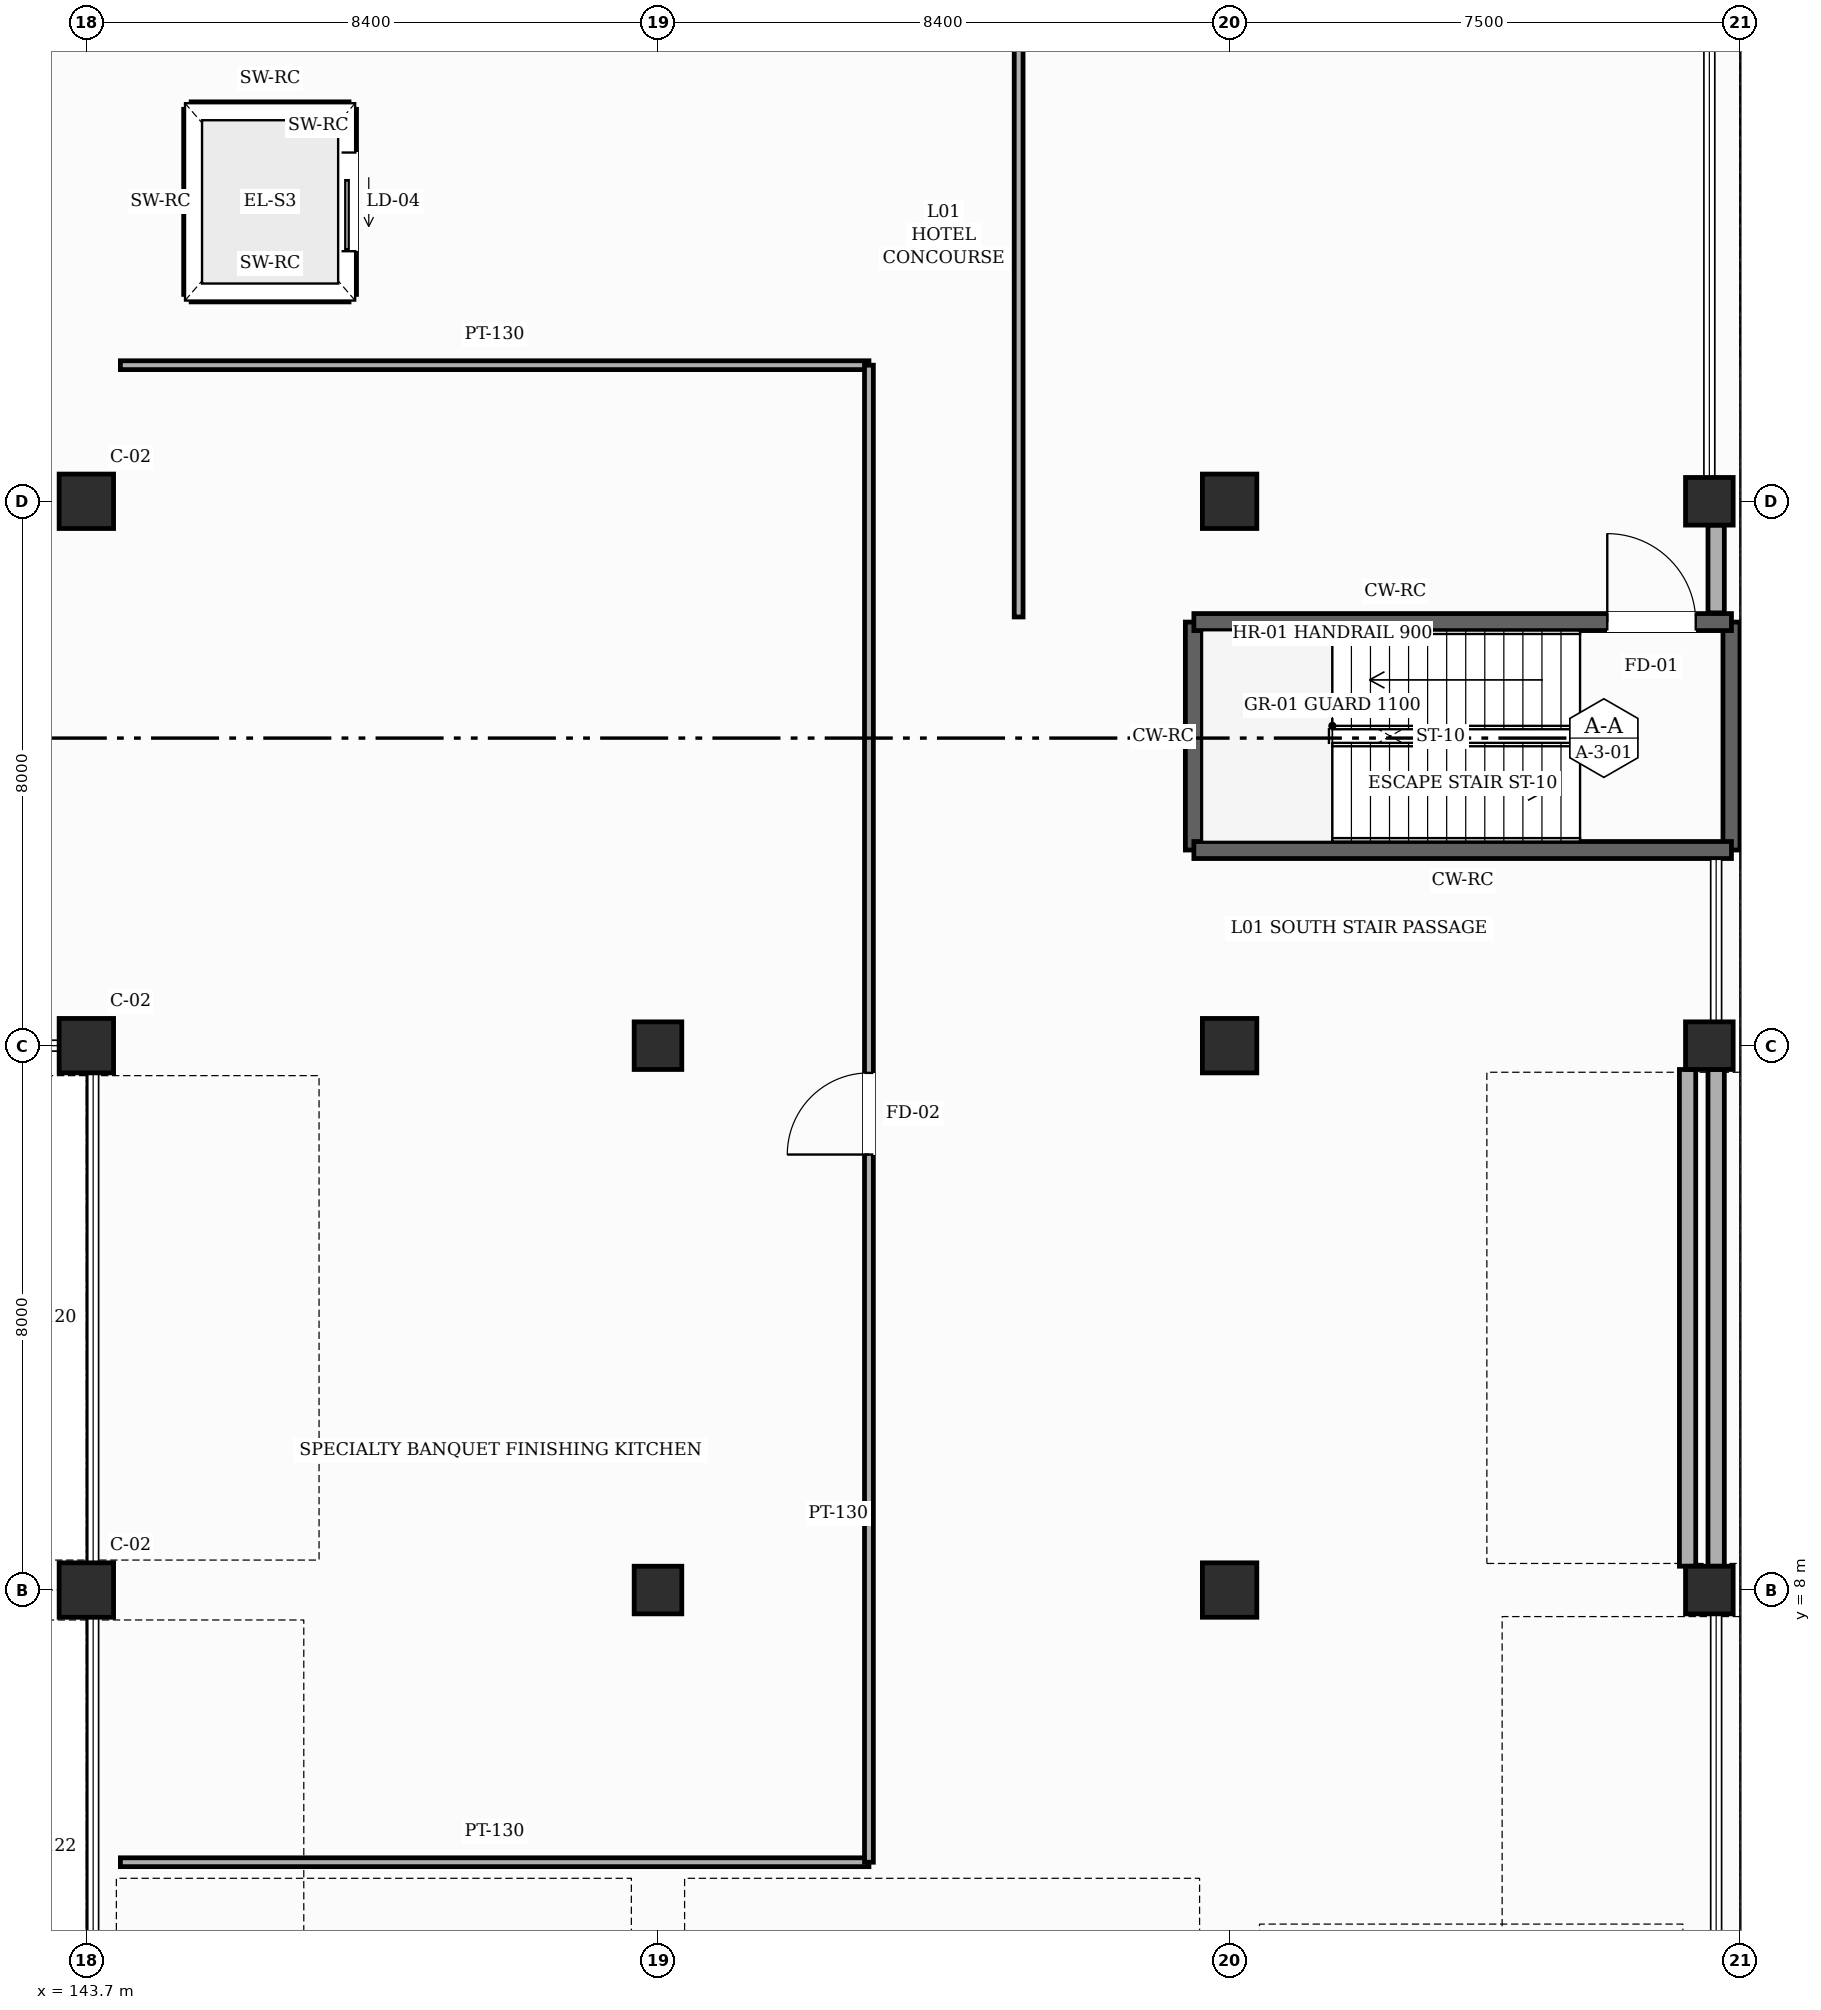
"""IFC4 building model, lengths in metres.
Left out: names, types, materials, properties, quantities, classifications, styles, units other than length and angle.
Written with IfcOpenShell. Run it as: python <this file> out.ifc"""

import sys

from ifc_helpers import new_model, si_unit, direction, frame, frame_2d, origin, origin_2d, place, context, subcontext, project, spatial, rectangle, hollow_rectangle, extrude, element, fill, save


model = new_model("IFC4")
c1 = context("Model", 3, precision=1e-05, world=origin(), true_north=direction((0.0, 1.0)))
c2 = subcontext(c1, "Body", "Model", "MODEL_VIEW")
j1 = project(units=[si_unit("LENGTHUNIT", "METRE"), si_unit("PLANEANGLEUNIT", "RADIAN")], contexts=[c1])
p1 = place(None, origin())
s1 = spatial("IfcSite", under=j1, at=p1, CompositionType="ELEMENT")
p2 = place(p1, origin())
s2 = spatial("IfcBuilding", under=s1, at=p2, CompositionType="ELEMENT")
p3 = place(p2, frame((0.0, 0.0, 5.4)))
s3 = spatial("IfcBuildingStorey", under=s2, at=p3, CompositionType="ELEMENT", Elevation=5.4)
for number, where, z_axis, x_axis in (
    (1, (143.7, 8.0, 0.0), (0.0, 0.0, 1.0), (1.0, 0.0, 0.0)),
    (2, (143.7, 16.0, 0.0), (0.0, 0.0, 1.0), (1.0, 0.0, 0.0)),
    (3, (143.7, 24.0, 0.0), (0.0, 0.0, 1.0), (1.0, 0.0, 0.0)),
):
    element("IfcColumn", number, at=place(p3, frame(where, z_axis=z_axis, x_axis=x_axis)), inside=s3, PredefinedType="COLUMN", context=c2, shape_type="SweptSolid", body=[
        extrude(hollow_rectangle(XDim=0.8, YDim=0.8, WallThickness=0.032, InnerFilletRadius=0.032, OuterFilletRadius=0.064, at=origin_2d()), origin(), (0.0, 0.0, 1.0), 4.8),
    ])
for number, where, z_axis, x_axis in (
    (4, (152.1, 8.0, 0.0), (0.0, 0.0, 1.0), (1.0, 0.0, 0.0)),
    (5, (152.1, 16.0, 0.0), (0.0, 0.0, 1.0), (1.0, 0.0, 0.0)),
):
    element("IfcColumn", number, at=place(p3, frame(where, z_axis=z_axis, x_axis=x_axis)), inside=s3, PredefinedType="COLUMN", context=c2, shape_type="SweptSolid", body=[
        extrude(hollow_rectangle(XDim=0.7, YDim=0.7, WallThickness=0.028, InnerFilletRadius=0.028, OuterFilletRadius=0.056, at=origin_2d()), origin(), (0.0, 0.0, 1.0), 4.8),
    ])
for number, where, z_axis, x_axis in (
    (6, (160.5, 8.0, 0.0), (0.0, 0.0, 1.0), (1.0, 0.0, 0.0)),
    (7, (160.5, 16.0, 0.0), (0.0, 0.0, 1.0), (1.0, 0.0, 0.0)),
    (8, (160.5, 24.0, 0.0), (0.0, 0.0, 1.0), (1.0, 0.0, 0.0)),
):
    element("IfcColumn", number, at=place(p3, frame(where, z_axis=z_axis, x_axis=x_axis)), inside=s3, PredefinedType="COLUMN", context=c2, shape_type="SweptSolid", body=[
        extrude(hollow_rectangle(XDim=0.8, YDim=0.8, WallThickness=0.032, InnerFilletRadius=0.032, OuterFilletRadius=0.064, at=origin_2d()), origin(), (0.0, 0.0, 1.0), 4.8),
    ])
for number, where, z_axis, x_axis in (
    (9, (167.55, 8.0, 0.0), (0.0, 0.0, 1.0), (1.0, 0.0, 0.0)),
    (10, (167.55, 16.0, 0.0), (0.0, 0.0, 1.0), (1.0, 0.0, 0.0)),
    (11, (167.55, 24.0, 0.0), (0.0, 0.0, 1.0), (1.0, 0.0, 0.0)),
):
    element("IfcColumn", number, at=place(p3, frame(where, z_axis=z_axis, x_axis=x_axis)), inside=s3, PredefinedType="COLUMN", context=c2, shape_type="SweptSolid", body=[
        extrude(hollow_rectangle(XDim=0.7, YDim=0.7, WallThickness=0.028, InnerFilletRadius=0.028, OuterFilletRadius=0.056, at=origin_2d()), origin(), (0.0, 0.0, 1.0), 4.8),
    ])
for number, where, z_axis, x_axis in (
    (12, (167.23, 8.35, 0.0), (0.0, 0.0, 1.0), (0.0, 1.0, 0.0)),
    (13, (167.65, 15.65, 0.0), (0.0, 0.0, 1.0), (0.0, -1.0, 0.0)),
):
    element("IfcWall", number, at=place(p3, frame(where, z_axis=z_axis, x_axis=x_axis)), inside=s3, PredefinedType="SOLIDWALL", context=c2, shape_type="SweptSolid", body=[
        extrude(rectangle(XDim=7.3, YDim=0.24, at=frame_2d((3.65, 0.0))), origin(), (0.0, 0.0, 1.0), 3.875),
    ])
p4 = place(p3, frame((167.65, 23.65, 0.0), z_axis=(0.0, 0.0, 1.0), x_axis=(0.0, -1.0, 0.0)))
e14 = element("IfcWall", 14, at=p4, inside=s3, PredefinedType="SOLIDWALL", context=c2, shape_type="SweptSolid", body=[
    extrude(rectangle(XDim=1.29, YDim=0.24, at=frame_2d((0.645, 0.0))), origin(), (0.0, 0.0, 1.0), 4.535),
])
for number, where, z_axis, x_axis in (
    (15, (167.875, 22.225, 0.0), (0.0, 0.0, 1.0), (0.0, -1.0, 0.0)),
    (16, (159.975, 18.875, 0.0), (0.0, 0.0, 1.0), (0.0, 1.0, 0.0)),
):
    element("IfcWall", number, at=place(p3, frame(where, z_axis=z_axis, x_axis=x_axis)), inside=s3, PredefinedType="SHEAR", context=c2, shape_type="SweptSolid", body=[
        extrude(rectangle(XDim=3.35, YDim=0.25, at=frame_2d((1.675, 0.0))), origin(), (0.0, 0.0, 1.0), 4.55),
    ])
p5 = place(p3, frame((159.975, 22.225, 0.0), z_axis=(0.0, 0.0, 1.0), x_axis=(1.0, 0.0, 0.0)))
e17 = element("IfcWall", 17, at=p5, inside=s3, PredefinedType="SHEAR", context=c2, shape_type="SweptSolid", body=[
    extrude(rectangle(XDim=7.9, YDim=0.25, at=frame_2d((3.95, 0.0))), origin(), (0.0, 0.0, 1.0), 4.55),
])
p6 = place(p5, frame((6.075, 0.0, 0.0)))
e18 = element("IfcOpeningElement", 18, at=p6, cuts=e17, PredefinedType="OPENING", context=c2, shape_type="SweptSolid", body=[
    extrude(rectangle(XDim=1.3, YDim=2.2, at=frame_2d((0.65, 1.1))), frame((0.0, 0.135, 0.0), z_axis=(0.0, -1.0, 0.0), x_axis=(1.0, 0.0, 0.0)), (0.0, 0.0, 1.0), 0.27),
])
p7 = place(p3, frame((167.875, 18.875, 0.0), z_axis=(0.0, 0.0, 1.0), x_axis=(-1.0, 0.0, 0.0)))
e19 = element("IfcWall", 19, at=p7, inside=s3, PredefinedType="SHEAR", context=c2, shape_type="SweptSolid", body=[
    extrude(rectangle(XDim=7.9, YDim=0.25, at=frame_2d((3.95, 0.0))), origin(), (0.0, 0.0, 1.0), 4.55),
])
for number, where, z_axis, x_axis in (
    (20, (145.24, 29.76, 0.0), (0.0, 0.0, 1.0), (1.0, 0.0, 0.0)),
    (21, (145.24, 27.04, 0.0), (0.0, 0.0, 1.0), (1.0, 0.0, 0.0)),
):
    element("IfcWall", number, at=place(p3, frame(where, z_axis=z_axis, x_axis=x_axis)), inside=s3, PredefinedType="SHEAR", context=c2, shape_type="SweptSolid", body=[
        extrude(rectangle(XDim=2.32, YDim=0.22, at=frame_2d((1.16, 0.0))), origin(), (0.0, 0.0, 1.0), 4.55),
    ])
p8 = place(p3, frame((147.56, 27.04, 0.0), z_axis=(0.0, 0.0, 1.0), x_axis=(0.0, 1.0, 0.0)))
e22 = element("IfcWall", 22, at=p8, inside=s3, PredefinedType="SHEAR", context=c2, shape_type="SweptSolid", body=[
    extrude(rectangle(XDim=2.72, YDim=0.22, at=frame_2d((1.36, 0.0))), origin(), (0.0, 0.0, 1.0), 4.55),
])
p9 = place(p8, frame((0.635, 0.0, 0.0)))
e23 = element("IfcOpeningElement", 23, at=p9, cuts=e22, PredefinedType="OPENING", context=c2, shape_type="SweptSolid", body=[
    extrude(rectangle(XDim=1.45, YDim=2.35, at=frame_2d((0.725, 1.175))), frame((0.0, 0.12, 0.0), z_axis=(0.0, -1.0, 0.0), x_axis=(1.0, 0.0, 0.0)), (0.0, 0.0, 1.0), 0.24),
])
p10 = place(p3, frame((145.24, 27.04, 0.0), z_axis=(0.0, 0.0, 1.0), x_axis=(0.0, 1.0, 0.0)))
e24 = element("IfcWall", 24, at=p10, inside=s3, PredefinedType="SHEAR", context=c2, shape_type="SweptSolid", body=[
    extrude(rectangle(XDim=2.72, YDim=0.22, at=frame_2d((1.36, 0.0))), origin(), (0.0, 0.0, 1.0), 4.55),
])
p11 = place(p3, frame((144.2, 4.0, 0.0), z_axis=(0.0, 0.0, 1.0), x_axis=(1.0, 0.0, 0.0)))
e25 = element("IfcWall", 25, at=p11, inside=s3, PredefinedType="PARTITIONING", context=c2, shape_type="SweptSolid", body=[
    extrude(rectangle(XDim=11.0, YDim=0.13, at=frame_2d((5.5, 0.0))), origin(), (0.0, 0.0, 1.0), 4.125),
])
p12 = place(p3, frame((144.2, 26.0, 0.0), z_axis=(0.0, 0.0, 1.0), x_axis=(1.0, 0.0, 0.0)))
e26 = element("IfcWall", 26, at=p12, inside=s3, PredefinedType="PARTITIONING", context=c2, shape_type="SweptSolid", body=[
    extrude(rectangle(XDim=11.0, YDim=0.13, at=frame_2d((5.5, 0.0))), origin(), (0.0, 0.0, 1.0), 4.535),
])
p13 = place(p3, frame((155.2, 4.0, 0.0), z_axis=(0.0, 0.0, 1.0), x_axis=(0.0, 1.0, 0.0)))
e27 = element("IfcWall", 27, at=p13, inside=s3, PredefinedType="PARTITIONING", context=c2, shape_type="SweptSolid", body=[
    extrude(rectangle(XDim=22.0, YDim=0.13, at=frame_2d((11.0, 0.0))), origin(), (0.0, 0.0, 1.0), 4.535),
])
p14 = place(p13, frame((10.4, 0.0, 0.0)))
e28 = element("IfcOpeningElement", 28, at=p14, cuts=e27, PredefinedType="OPENING", context=c2, shape_type="SweptSolid", body=[
    extrude(rectangle(XDim=1.2, YDim=2.2, at=frame_2d((0.6, 1.1))), frame((0.0, 0.075, 0.0), z_axis=(0.0, -1.0, 0.0), x_axis=(1.0, 0.0, 0.0)), (0.0, 0.0, 1.0), 0.15),
])
p15 = place(p3, frame((157.4, 22.3, 0.0), z_axis=(0.0, 0.0, 1.0), x_axis=(0.0, 1.0, 0.0)))
e29 = element("IfcWall", 29, at=p15, inside=s3, PredefinedType="PARTITIONING", context=c2, shape_type="SweptSolid", body=[
    extrude(rectangle(XDim=48.5, YDim=0.13, at=frame_2d((24.25, 0.0))), origin(), (0.0, 0.0, 1.0), 4.535),
])
p16 = place(p15, frame((23.325, 0.0, 0.0)))
e30 = element("IfcOpeningElement", 30, at=p16, cuts=e29, PredefinedType="OPENING", context=c2, shape_type="SweptSolid", body=[
    extrude(rectangle(XDim=1.85, YDim=2.4, at=frame_2d((0.925, 1.2))), frame((0.0, 0.075, 0.0), z_axis=(0.0, -1.0, 0.0), x_axis=(1.0, 0.0, 0.0)), (0.0, 0.0, 1.0), 0.15),
])
p17 = place(p6, origin())
e31 = element("IfcDoor", 31, at=p17, inside=s3, OperationType="SINGLE_SWING_LEFT", PredefinedType="DOOR", context=c2, shape_type="SweptSolid", body=[
    extrude(rectangle(XDim=1.3, YDim=2.2, at=frame_2d((0.65, 1.1))), frame((0.0, 0.025, 0.0), z_axis=(0.0, -1.0, 0.0), x_axis=(1.0, 0.0, 0.0)), (0.0, 0.0, 1.0), 0.05),
])
fill(e18, e31)
p18 = place(p9, origin())
e32 = element("IfcDoor", 32, at=p18, inside=s3, OperationType="SLIDING_TO_LEFT", PredefinedType="DOOR", context=c2, shape_type="SweptSolid", body=[
    extrude(rectangle(XDim=1.45, YDim=2.35, at=frame_2d((0.725, 1.175))), frame((0.0, 0.025, 0.0), z_axis=(0.0, -1.0, 0.0), x_axis=(1.0, 0.0, 0.0)), (0.0, 0.0, 1.0), 0.05),
])
fill(e23, e32)
p19 = place(p14, origin())
e33 = element("IfcDoor", 33, at=p19, inside=s3, OperationType="SINGLE_SWING_LEFT", PredefinedType="DOOR", context=c2, shape_type="SweptSolid", body=[
    extrude(rectangle(XDim=1.2, YDim=2.2, at=frame_2d((0.6, 1.1))), frame((0.0, 0.025, 0.0), z_axis=(0.0, -1.0, 0.0), x_axis=(1.0, 0.0, 0.0)), (0.0, 0.0, 1.0), 0.05),
])
fill(e28, e33)
save(model, sys.argv[1])
